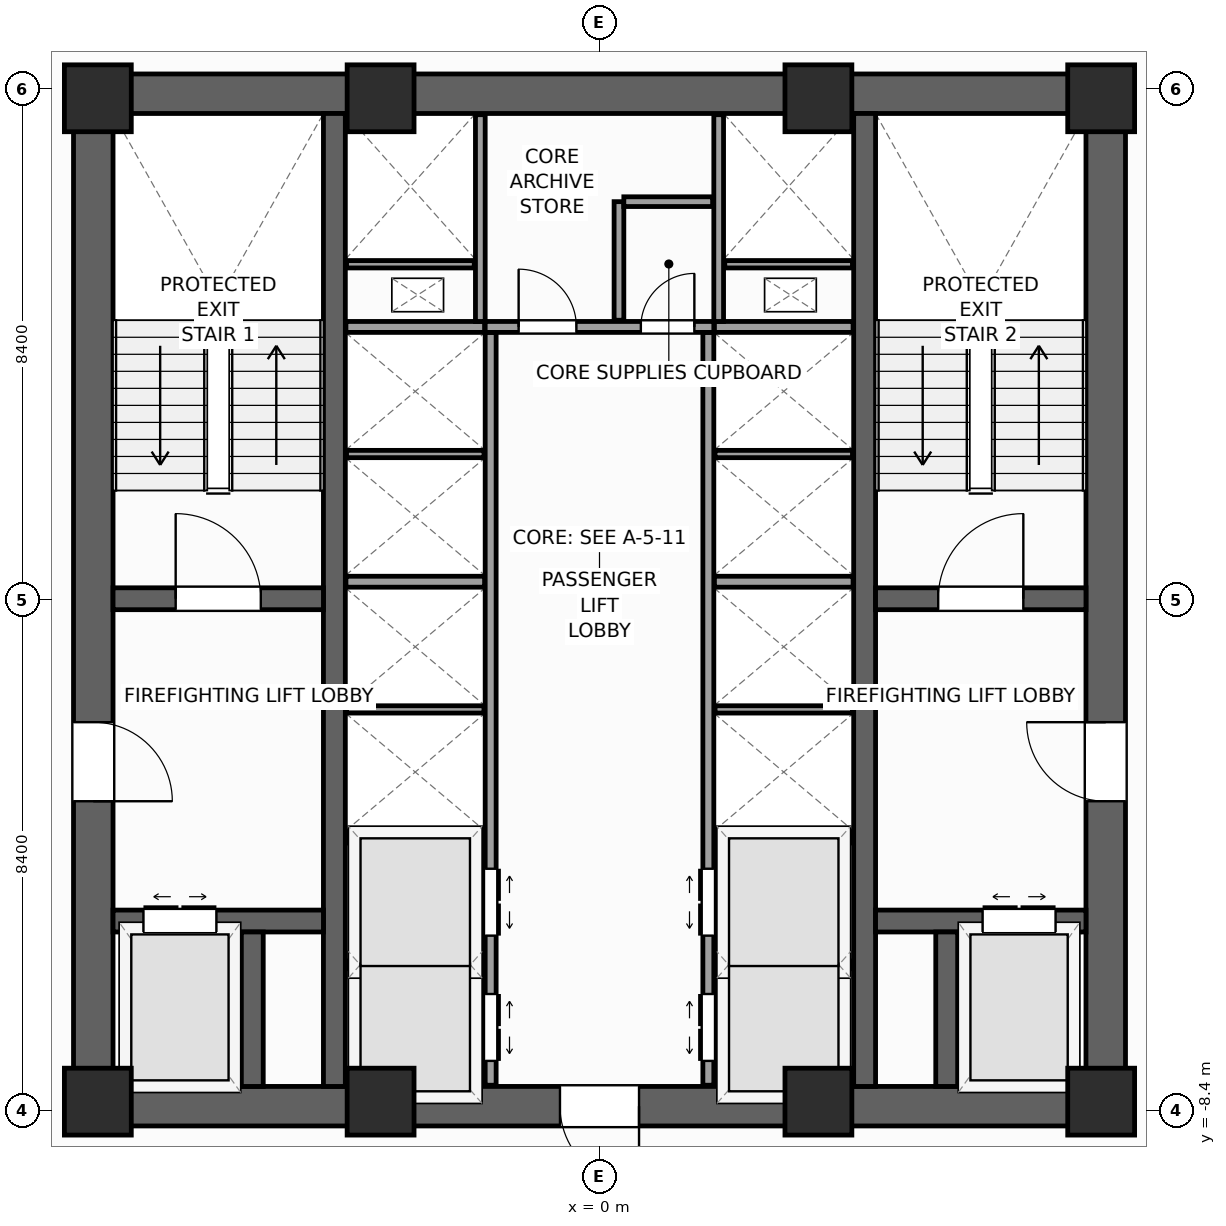
"""IFC4 building model, lengths in metres.
Left out: names, types, materials, properties, quantities, classifications, styles, units other than length and angle.
Written with IfcOpenShell. Run it as: python <this file> out.ifc"""

import sys

from ifc_helpers import new_model, si_unit, direction, frame, frame_2d, origin, origin_2d, place, context, subcontext, project, spatial, rectangle, extrude, source, transform, mapped, element, fill, save


model = new_model("IFC4")
c1 = context("Model", 3, precision=1e-05, world=origin(), true_north=direction((0.0, 1.0)))
c2 = subcontext(c1, "Body", "Model", "MODEL_VIEW")
j1 = project(units=[si_unit("LENGTHUNIT", "METRE"), si_unit("PLANEANGLEUNIT", "RADIAN")], contexts=[c1])
p1 = place(None, origin())
s1 = spatial("IfcSite", under=j1, at=p1, CompositionType="ELEMENT")
p2 = place(p1, origin())
s2 = spatial("IfcBuilding", under=s1, at=p2, CompositionType="ELEMENT")
p3 = place(p2, frame((0.0, 0.0, 131.2)))
s3 = spatial("IfcBuildingStorey", under=s2, at=p3, CompositionType="ELEMENT", Elevation=131.2)
p4 = place(p3, frame((-8.65, -8.325, 0.0), z_axis=(0.0, 0.0, 1.0), x_axis=(1.0, 0.0, 0.0)))
e1 = element("IfcWall", 1, at=p4, inside=s3, PredefinedType="SHEAR", context=c2, shape_type="SweptSolid", body=[
    extrude(rectangle(XDim=17.3, YDim=0.65, at=frame_2d((8.65, 0.0))), origin(), (0.0, 0.0, 1.0), 4.0),
])
p5 = place(p4, frame((8.0, 0.0, 0.0)))
e2 = element("IfcOpeningElement", 2, at=p5, cuts=e1, PredefinedType="OPENING", context=c2, shape_type="SweptSolid", body=[
    extrude(rectangle(XDim=1.3, YDim=2.2, at=frame_2d((0.65, 1.1))), frame((0.0, 0.335, 0.0), z_axis=(0.0, -1.0, 0.0), x_axis=(1.0, 0.0, 0.0)), (0.0, 0.0, 1.0), 0.67),
])
p6 = place(p3, frame((-8.65, 8.325, 0.0), z_axis=(0.0, 0.0, 1.0), x_axis=(1.0, 0.0, 0.0)))
e3 = element("IfcWall", 3, at=p6, inside=s3, PredefinedType="SHEAR", context=c2, shape_type="SweptSolid", body=[
    extrude(rectangle(XDim=17.3, YDim=0.65, at=frame_2d((8.65, 0.0))), origin(), (0.0, 0.0, 1.0), 4.0),
])
p7 = place(p3, frame((-8.325, -8.0, 0.0), z_axis=(0.0, 0.0, 1.0), x_axis=(0.0, 1.0, 0.0)))
e4 = element("IfcWall", 4, at=p7, inside=s3, PredefinedType="SHEAR", context=c2, shape_type="SweptSolid", body=[
    extrude(rectangle(XDim=16.0, YDim=0.65, at=frame_2d((8.0, 0.0))), origin(), (0.0, 0.0, 1.0), 4.0),
])
p8 = place(p7, frame((4.69, 0.0, 0.0)))
e5 = element("IfcOpeningElement", 5, at=p8, cuts=e4, PredefinedType="OPENING", context=c2, shape_type="SweptSolid", body=[
    extrude(rectangle(XDim=1.3, YDim=2.2, at=frame_2d((0.65, 1.1))), frame((0.0, 0.335, 0.0), z_axis=(0.0, -1.0, 0.0), x_axis=(1.0, 0.0, 0.0)), (0.0, 0.0, 1.0), 0.67),
])
p9 = place(p3, frame((8.325, -8.0, 0.0), z_axis=(0.0, 0.0, 1.0), x_axis=(0.0, 1.0, 0.0)))
e6 = element("IfcWall", 6, at=p9, inside=s3, PredefinedType="SHEAR", context=c2, shape_type="SweptSolid", body=[
    extrude(rectangle(XDim=16.0, YDim=0.65, at=frame_2d((8.0, 0.0))), origin(), (0.0, 0.0, 1.0), 4.0),
])
p10 = place(p9, frame((4.69, 0.0, 0.0)))
e7 = element("IfcOpeningElement", 7, at=p10, cuts=e6, PredefinedType="OPENING", context=c2, shape_type="SweptSolid", body=[
    extrude(rectangle(XDim=1.3, YDim=2.2, at=frame_2d((0.65, 1.1))), frame((0.0, 0.335, 0.0), z_axis=(0.0, -1.0, 0.0), x_axis=(1.0, 0.0, 0.0)), (0.0, 0.0, 1.0), 0.67),
])
for number, where, z_axis, x_axis in (
    (8, (-4.36, -8.0, 0.0), (0.0, 0.0, 1.0), (0.0, 1.0, 0.0)),
    (9, (4.36, -8.0, 0.0), (0.0, 0.0, 1.0), (0.0, 1.0, 0.0)),
):
    element("IfcWall", number, at=place(p3, frame(where, z_axis=z_axis, x_axis=x_axis)), inside=s3, PredefinedType="SHEAR", context=c2, shape_type="SweptSolid", body=[
        extrude(rectangle(XDim=16.0, YDim=0.36, at=frame_2d((8.0, 0.0))), origin(), (0.0, 0.0, 1.0), 4.0),
    ])
p11 = place(p3, frame((-8.0, 0.02, 0.0), z_axis=(0.0, 0.0, 1.0), x_axis=(1.0, 0.0, 0.0)))
e10 = element("IfcWall", 10, at=p11, inside=s3, PredefinedType="SHEAR", context=c2, shape_type="SweptSolid", body=[
    extrude(rectangle(XDim=3.46, YDim=0.36, at=frame_2d((1.73, 0.0))), origin(), (0.0, 0.0, 1.0), 4.0),
])
p12 = place(p11, frame((1.03, 0.0, 0.0)))
e11 = element("IfcOpeningElement", 11, at=p12, cuts=e10, PredefinedType="OPENING", context=c2, shape_type="SweptSolid", body=[
    extrude(rectangle(XDim=1.4, YDim=2.2, at=frame_2d((0.7, 1.1))), frame((0.0, 0.19, 0.0), z_axis=(0.0, -1.0, 0.0), x_axis=(1.0, 0.0, 0.0)), (0.0, 0.0, 1.0), 0.38),
])
p13 = place(p3, frame((4.54, 0.02, 0.0), z_axis=(0.0, 0.0, 1.0), x_axis=(1.0, 0.0, 0.0)))
e12 = element("IfcWall", 12, at=p13, inside=s3, PredefinedType="SHEAR", context=c2, shape_type="SweptSolid", body=[
    extrude(rectangle(XDim=3.46, YDim=0.36, at=frame_2d((1.73, 0.0))), origin(), (0.0, 0.0, 1.0), 4.0),
])
p14 = place(p13, frame((1.03, 0.0, 0.0)))
e13 = element("IfcOpeningElement", 13, at=p14, cuts=e12, PredefinedType="OPENING", context=c2, shape_type="SweptSolid", body=[
    extrude(rectangle(XDim=1.4, YDim=2.2, at=frame_2d((0.7, 1.1))), frame((0.0, 0.19, 0.0), z_axis=(0.0, -1.0, 0.0), x_axis=(1.0, 0.0, 0.0)), (0.0, 0.0, 1.0), 0.38),
])
p15 = place(p3, frame((-8.0, -5.28, 0.0), z_axis=(0.0, 0.0, 1.0), x_axis=(1.0, 0.0, 0.0)))
e14 = element("IfcWall", 14, at=p15, inside=s3, PredefinedType="SHEAR", context=c2, shape_type="SweptSolid", body=[
    extrude(rectangle(XDim=3.46, YDim=0.36, at=frame_2d((1.73, 0.0))), origin(), (0.0, 0.0, 1.0), 4.0),
])
p16 = place(p15, frame((0.5, 0.0, 0.0)))
e15 = element("IfcOpeningElement", 15, at=p16, cuts=e14, PredefinedType="OPENING", context=c2, shape_type="SweptSolid", body=[
    extrude(rectangle(XDim=1.2, YDim=2.25, at=frame_2d((0.6, 1.125))), frame((0.0, 0.19, 0.0), z_axis=(0.0, -1.0, 0.0), x_axis=(1.0, 0.0, 0.0)), (0.0, 0.0, 1.0), 0.38),
])
p17 = place(p3, frame((4.54, -5.28, 0.0), z_axis=(0.0, 0.0, 1.0), x_axis=(1.0, 0.0, 0.0)))
e16 = element("IfcWall", 16, at=p17, inside=s3, PredefinedType="SHEAR", context=c2, shape_type="SweptSolid", body=[
    extrude(rectangle(XDim=3.46, YDim=0.36, at=frame_2d((1.73, 0.0))), origin(), (0.0, 0.0, 1.0), 4.0),
])
p18 = place(p17, frame((1.76, 0.0, 0.0)))
e17 = element("IfcOpeningElement", 17, at=p18, cuts=e16, PredefinedType="OPENING", context=c2, shape_type="SweptSolid", body=[
    extrude(rectangle(XDim=1.2, YDim=2.25, at=frame_2d((0.6, 1.125))), frame((0.0, 0.19, 0.0), z_axis=(0.0, -1.0, 0.0), x_axis=(1.0, 0.0, 0.0)), (0.0, 0.0, 1.0), 0.38),
])
for number, where, z_axis, x_axis in (
    (18, (-5.71, -8.0, 0.0), (0.0, 0.0, 1.0), (0.0, 1.0, 0.0)),
    (19, (5.71, -8.0, 0.0), (0.0, 0.0, 1.0), (0.0, 1.0, 0.0)),
):
    element("IfcWall", number, at=place(p3, frame(where, z_axis=z_axis, x_axis=x_axis)), inside=s3, PredefinedType="SHEAR", context=c2, shape_type="SweptSolid", body=[
        extrude(rectangle(XDim=2.54, YDim=0.36, at=frame_2d((1.27, 0.0))), origin(), (0.0, 0.0, 1.0), 4.0),
    ])
m1 = source(origin(), c2, "Body", "SweptSolid", [
    extrude(rectangle(XDim=1.1, YDim=1.1, at=origin_2d()), origin(), (0.0, 0.0, 1.0), 4.0),
])
for number, where, z_axis, x_axis in (
    (20, (-8.25, -8.25, 0.0), (0.0, 0.0, 1.0), (1.0, 0.0, 0.0)),
    (21, (8.25, -8.25, 0.0), (0.0, 0.0, 1.0), (1.0, 0.0, 0.0)),
    (22, (8.25, 8.25, 0.0), (0.0, 0.0, 1.0), (1.0, 0.0, 0.0)),
    (23, (-8.25, 8.25, 0.0), (0.0, 0.0, 1.0), (1.0, 0.0, 0.0)),
    (24, (-3.6, -8.25, 0.0), (0.0, 0.0, 1.0), (1.0, 0.0, 0.0)),
    (25, (3.6, -8.25, 0.0), (0.0, 0.0, 1.0), (1.0, 0.0, 0.0)),
    (26, (-3.6, 8.25, 0.0), (0.0, 0.0, 1.0), (1.0, 0.0, 0.0)),
    (27, (3.6, 8.25, 0.0), (0.0, 0.0, 1.0), (1.0, 0.0, 0.0)),
):
    element("IfcColumn", number, at=place(p3, frame(where, z_axis=z_axis, x_axis=x_axis)), inside=s3, PredefinedType="PILASTER", context=c2, shape_type="MappedRepresentation", body=[
        mapped(m1, transform((0.0, 0.0, 0.0), scale=1.0)),
    ])
p19 = place(p3, frame((-1.79, -7.98, 0.0), z_axis=(0.0, 0.0, 1.0), x_axis=(0.0, 1.0, 0.0)))
e28 = element("IfcWall", 28, at=p19, inside=s3, PredefinedType="PARTITIONING", context=c2, shape_type="SweptSolid", body=[
    extrude(rectangle(XDim=12.38, YDim=0.18, at=frame_2d((6.19, 0.0))), origin(), (0.0, 0.0, 1.0), 3.74),
])
p20 = place(p19, frame((0.4, 0.0, 0.0)))
e29 = element("IfcOpeningElement", 29, at=p20, cuts=e28, PredefinedType="OPENING", context=c2, shape_type="SweptSolid", body=[
    extrude(rectangle(XDim=1.1, YDim=2.2, at=frame_2d((0.55, 1.1))), frame((0.0, 0.1, 0.0), z_axis=(0.0, -1.0, 0.0), x_axis=(1.0, 0.0, 0.0)), (0.0, 0.0, 1.0), 0.2),
])
p21 = place(p19, frame((2.46, 0.0, 0.0)))
e30 = element("IfcOpeningElement", 30, at=p21, cuts=e28, PredefinedType="OPENING", context=c2, shape_type="SweptSolid", body=[
    extrude(rectangle(XDim=1.1, YDim=2.2, at=frame_2d((0.55, 1.1))), frame((0.0, 0.1, 0.0), z_axis=(0.0, -1.0, 0.0), x_axis=(1.0, 0.0, 0.0)), (0.0, 0.0, 1.0), 0.2),
])
p22 = place(p3, frame((1.79, -7.98, 0.0), z_axis=(0.0, 0.0, 1.0), x_axis=(0.0, 1.0, 0.0)))
e31 = element("IfcWall", 31, at=p22, inside=s3, PredefinedType="PARTITIONING", context=c2, shape_type="SweptSolid", body=[
    extrude(rectangle(XDim=12.38, YDim=0.18, at=frame_2d((6.19, 0.0))), origin(), (0.0, 0.0, 1.0), 3.74),
])
p23 = place(p22, frame((0.4, 0.0, 0.0)))
e32 = element("IfcOpeningElement", 32, at=p23, cuts=e31, PredefinedType="OPENING", context=c2, shape_type="SweptSolid", body=[
    extrude(rectangle(XDim=1.1, YDim=2.2, at=frame_2d((0.55, 1.1))), frame((0.0, 0.1, 0.0), z_axis=(0.0, -1.0, 0.0), x_axis=(1.0, 0.0, 0.0)), (0.0, 0.0, 1.0), 0.2),
])
p24 = place(p22, frame((2.46, 0.0, 0.0)))
e33 = element("IfcOpeningElement", 33, at=p24, cuts=e31, PredefinedType="OPENING", context=c2, shape_type="SweptSolid", body=[
    extrude(rectangle(XDim=1.1, YDim=2.2, at=frame_2d((0.55, 1.1))), frame((0.0, 0.1, 0.0), z_axis=(0.0, -1.0, 0.0), x_axis=(1.0, 0.0, 0.0)), (0.0, 0.0, 1.0), 0.2),
])
p25 = place(p3, frame((-1.88, 4.49, 0.0), z_axis=(0.0, 0.0, 1.0), x_axis=(1.0, 0.0, 0.0)))
e34 = element("IfcWall", 34, at=p25, inside=s3, PredefinedType="PARTITIONING", context=c2, shape_type="SweptSolid", body=[
    extrude(rectangle(XDim=3.76, YDim=0.18, at=frame_2d((1.88, 0.0))), origin(), (0.0, 0.0, 1.0), 3.74),
])
p26 = place(p25, frame((0.55, 0.0, 0.0)))
e35 = element("IfcOpeningElement", 35, at=p26, cuts=e34, PredefinedType="OPENING", context=c2, shape_type="SweptSolid", body=[
    extrude(rectangle(XDim=0.95, YDim=2.1, at=frame_2d((0.475, 1.05))), frame((0.0, 0.1, 0.0), z_axis=(0.0, -1.0, 0.0), x_axis=(1.0, 0.0, 0.0)), (0.0, 0.0, 1.0), 0.2),
])
p27 = place(p25, frame((2.56, 0.0, 0.0)))
e36 = element("IfcOpeningElement", 36, at=p27, cuts=e34, PredefinedType="OPENING", context=c2, shape_type="SweptSolid", body=[
    extrude(rectangle(XDim=0.88, YDim=2.1, at=frame_2d((0.44, 1.05))), frame((0.0, 0.1, 0.0), z_axis=(0.0, -1.0, 0.0), x_axis=(1.0, 0.0, 0.0)), (0.0, 0.0, 1.0), 0.2),
])
for number, where, z_axis, x_axis in (
    (37, (-4.17, -3.9, 0.0), (0.0, 0.0, 1.0), (1.0, 0.0, 0.0)),
    (38, (1.89, -3.9, 0.0), (0.0, 0.0, 1.0), (1.0, 0.0, 0.0)),
    (39, (-4.17, 0.3, 0.0), (0.0, 0.0, 1.0), (1.0, 0.0, 0.0)),
    (40, (1.89, 0.3, 0.0), (0.0, 0.0, 1.0), (1.0, 0.0, 0.0)),
    (41, (-4.17, 4.49, 0.0), (0.0, 0.0, 1.0), (1.0, 0.0, 0.0)),
    (42, (1.89, 4.49, 0.0), (0.0, 0.0, 1.0), (1.0, 0.0, 0.0)),
):
    element("IfcWall", number, at=place(p3, frame(where, z_axis=z_axis, x_axis=x_axis)), inside=s3, PredefinedType="PARTITIONING", context=c2, shape_type="SweptSolid", body=[
        extrude(rectangle(XDim=2.28, YDim=0.18, at=frame_2d((1.14, 0.0))), origin(), (0.0, 0.0, 1.0), 3.74),
    ])
for number, where, z_axis, x_axis in (
    (43, (-4.16, -6.0, 0.0), (0.0, 0.0, 1.0), (1.0, 0.0, 0.0)),
    (44, (1.9, -6.0, 0.0), (0.0, 0.0, 1.0), (1.0, 0.0, 0.0)),
    (45, (-4.16, -1.8, 0.0), (0.0, 0.0, 1.0), (1.0, 0.0, 0.0)),
    (46, (1.9, -1.8, 0.0), (0.0, 0.0, 1.0), (1.0, 0.0, 0.0)),
    (47, (-4.16, 2.4, 0.0), (0.0, 0.0, 1.0), (1.0, 0.0, 0.0)),
    (48, (1.9, 2.4, 0.0), (0.0, 0.0, 1.0), (1.0, 0.0, 0.0)),
):
    element("IfcWall", number, at=place(p3, frame(where, z_axis=z_axis, x_axis=x_axis)), inside=s3, PredefinedType="PARTITIONING", context=c2, shape_type="SweptSolid", body=[
        extrude(rectangle(XDim=2.26, YDim=0.12, at=frame_2d((1.13, 0.0))), origin(), (0.0, 0.0, 1.0), 3.74),
    ])
for number, where, z_axis, x_axis in (
    (49, (-1.96, 4.58, 0.0), (0.0, 0.0, 1.0), (0.0, 1.0, 0.0)),
    (50, (1.96, 4.58, 0.0), (0.0, 0.0, 1.0), (0.0, 1.0, 0.0)),
):
    element("IfcWall", number, at=place(p3, frame(where, z_axis=z_axis, x_axis=x_axis)), inside=s3, PredefinedType="PARTITIONING", context=c2, shape_type="SweptSolid", body=[
        extrude(rectangle(XDim=3.4, YDim=0.16, at=frame_2d((1.7, 0.0))), origin(), (0.0, 0.0, 1.0), 3.74),
    ])
for number, where, z_axis, x_axis in (
    (51, (-4.16, 5.52, 0.0), (0.0, 0.0, 1.0), (1.0, 0.0, 0.0)),
    (52, (2.06, 5.52, 0.0), (0.0, 0.0, 1.0), (1.0, 0.0, 0.0)),
):
    element("IfcWall", number, at=place(p3, frame(where, z_axis=z_axis, x_axis=x_axis)), inside=s3, PredefinedType="PARTITIONING", context=c2, shape_type="SweptSolid", body=[
        extrude(rectangle(XDim=2.1, YDim=0.12, at=frame_2d((1.05, 0.0))), origin(), (0.0, 0.0, 1.0), 3.74),
    ])
p28 = place(p3, frame((0.32, 4.6, 0.0), z_axis=(0.0, 0.0, 1.0), x_axis=(0.0, 1.0, 0.0)))
e53 = element("IfcWall", 53, at=p28, inside=s3, PredefinedType="PARTITIONING", context=c2, shape_type="SweptSolid", body=[
    extrude(rectangle(XDim=1.95, YDim=0.16, at=frame_2d((0.975, 0.0))), origin(), (0.0, 0.0, 1.0), 3.74),
])
p29 = place(p3, frame((0.4, 6.55, 0.0), z_axis=(0.0, 0.0, 1.0), x_axis=(1.0, 0.0, 0.0)))
e54 = element("IfcWall", 54, at=p29, inside=s3, PredefinedType="PARTITIONING", context=c2, shape_type="SweptSolid", body=[
    extrude(rectangle(XDim=1.46, YDim=0.16, at=frame_2d((0.73, 0.0))), origin(), (0.0, 0.0, 1.0), 3.74),
])
m2 = source(origin(), c2, "Body", "SweptSolid", [
    extrude(rectangle(XDim=1.4, YDim=2.2, at=frame_2d((0.7, 1.1))), frame((0.0, 0.025, 0.0), z_axis=(0.0, -1.0, 0.0), x_axis=(1.0, 0.0, 0.0)), (0.0, 0.0, 1.0), 0.05),
])
p30 = place(p12, origin())
e55 = element("IfcDoor", 55, at=p30, inside=s3, OperationType="SINGLE_SWING_LEFT", PredefinedType="DOOR", context=c2, shape_type="MappedRepresentation", body=[
    mapped(m2, transform((0.0, 0.0, 0.0), scale=1.0)),
])
fill(e11, e55)
p31 = place(p14, origin())
e56 = element("IfcDoor", 56, at=p31, inside=s3, OperationType="SINGLE_SWING_RIGHT", PredefinedType="DOOR", context=c2, shape_type="MappedRepresentation", body=[
    mapped(m2, transform((0.0, 0.0, 0.0), scale=1.0)),
])
fill(e13, e56)
m3 = source(origin(), c2, "Body", "SweptSolid", [
    extrude(rectangle(XDim=1.3, YDim=2.2, at=frame_2d((0.65, 1.1))), frame((0.0, 0.025, 0.0), z_axis=(0.0, -1.0, 0.0), x_axis=(1.0, 0.0, 0.0)), (0.0, 0.0, 1.0), 0.05),
])
p32 = place(p8, frame((1.3, 0.0, 0.0), z_axis=(0.0, 0.0, 1.0), x_axis=(-1.0, 0.0, 0.0)))
e57 = element("IfcDoor", 57, at=p32, inside=s3, OperationType="SINGLE_SWING_LEFT", PredefinedType="DOOR", context=c2, shape_type="MappedRepresentation", body=[
    mapped(m3, transform((0.0, 0.0, 0.0), scale=1.0)),
])
fill(e5, e57)
p33 = place(p10, origin())
e58 = element("IfcDoor", 58, at=p33, inside=s3, OperationType="SINGLE_SWING_RIGHT", PredefinedType="DOOR", context=c2, shape_type="MappedRepresentation", body=[
    mapped(m3, transform((0.0, 0.0, 0.0), scale=1.0)),
])
fill(e7, e58)
p34 = place(p5, frame((1.3, 0.0, 0.0), z_axis=(0.0, 0.0, 1.0), x_axis=(-1.0, 0.0, 0.0)))
e59 = element("IfcDoor", 59, at=p34, inside=s3, OperationType="SINGLE_SWING_RIGHT", PredefinedType="DOOR", context=c2, shape_type="MappedRepresentation", body=[
    mapped(m3, transform((0.0, 0.0, 0.0), scale=1.0)),
])
fill(e2, e59)
m4 = source(origin(), c2, "Body", "SweptSolid", [
    extrude(rectangle(XDim=1.2, YDim=2.25, at=frame_2d((0.6, 1.125))), frame((0.0, 0.025, 0.0), z_axis=(0.0, -1.0, 0.0), x_axis=(1.0, 0.0, 0.0)), (0.0, 0.0, 1.0), 0.05),
])
p35 = place(p16, origin())
e60 = element("IfcDoor", 60, at=p35, inside=s3, OperationType="DOUBLE_DOOR_SLIDING", PredefinedType="DOOR", context=c2, shape_type="MappedRepresentation", body=[
    mapped(m4, transform((0.0, 0.0, 0.0), scale=1.0)),
])
fill(e15, e60)
p36 = place(p18, origin())
e61 = element("IfcDoor", 61, at=p36, inside=s3, OperationType="DOUBLE_DOOR_SLIDING", PredefinedType="DOOR", context=c2, shape_type="MappedRepresentation", body=[
    mapped(m4, transform((0.0, 0.0, 0.0), scale=1.0)),
])
fill(e17, e61)
m5 = source(origin(), c2, "Body", "SweptSolid", [
    extrude(rectangle(XDim=1.1, YDim=2.2, at=frame_2d((0.55, 1.1))), frame((0.0, 0.025, 0.0), z_axis=(0.0, -1.0, 0.0), x_axis=(1.0, 0.0, 0.0)), (0.0, 0.0, 1.0), 0.05),
])
p37 = place(p20, frame((1.1, 0.0, 0.0), z_axis=(0.0, 0.0, 1.0), x_axis=(-1.0, 0.0, 0.0)))
e62 = element("IfcDoor", 62, at=p37, inside=s3, OperationType="DOUBLE_DOOR_SLIDING", PredefinedType="DOOR", context=c2, shape_type="MappedRepresentation", body=[
    mapped(m5, transform((0.0, 0.0, 0.0), scale=1.0)),
])
fill(e29, e62)
p38 = place(p21, frame((1.1, 0.0, 0.0), z_axis=(0.0, 0.0, 1.0), x_axis=(-1.0, 0.0, 0.0)))
e63 = element("IfcDoor", 63, at=p38, inside=s3, OperationType="DOUBLE_DOOR_SLIDING", PredefinedType="DOOR", context=c2, shape_type="MappedRepresentation", body=[
    mapped(m5, transform((0.0, 0.0, 0.0), scale=1.0)),
])
fill(e30, e63)
p39 = place(p23, origin())
e64 = element("IfcDoor", 64, at=p39, inside=s3, OperationType="DOUBLE_DOOR_SLIDING", PredefinedType="DOOR", context=c2, shape_type="MappedRepresentation", body=[
    mapped(m5, transform((0.0, 0.0, 0.0), scale=1.0)),
])
fill(e32, e64)
p40 = place(p24, origin())
e65 = element("IfcDoor", 65, at=p40, inside=s3, OperationType="DOUBLE_DOOR_SLIDING", PredefinedType="DOOR", context=c2, shape_type="MappedRepresentation", body=[
    mapped(m5, transform((0.0, 0.0, 0.0), scale=1.0)),
])
fill(e33, e65)
m6 = source(origin(), c2, "Body", "SweptSolid", [
    extrude(rectangle(XDim=0.95, YDim=2.1, at=frame_2d((0.475, 1.05))), frame((0.0, 0.025, 0.0), z_axis=(0.0, -1.0, 0.0), x_axis=(1.0, 0.0, 0.0)), (0.0, 0.0, 1.0), 0.05),
])
p41 = place(p26, origin())
e66 = element("IfcDoor", 66, at=p41, inside=s3, OperationType="SINGLE_SWING_LEFT", PredefinedType="DOOR", context=c2, shape_type="MappedRepresentation", body=[
    mapped(m6, transform((0.0, 0.0, 0.0), scale=1.0)),
])
fill(e35, e66)
m7 = source(origin(), c2, "Body", "SweptSolid", [
    extrude(rectangle(XDim=0.88, YDim=2.1, at=frame_2d((0.44, 1.05))), frame((0.0, 0.025, 0.0), z_axis=(0.0, -1.0, 0.0), x_axis=(1.0, 0.0, 0.0)), (0.0, 0.0, 1.0), 0.05),
])
p42 = place(p27, origin())
e67 = element("IfcDoor", 67, at=p42, inside=s3, OperationType="SINGLE_SWING_RIGHT", PredefinedType="DOOR", context=c2, shape_type="MappedRepresentation", body=[
    mapped(m7, transform((0.0, 0.0, 0.0), scale=1.0)),
])
fill(e36, e67)
save(model, sys.argv[1])
